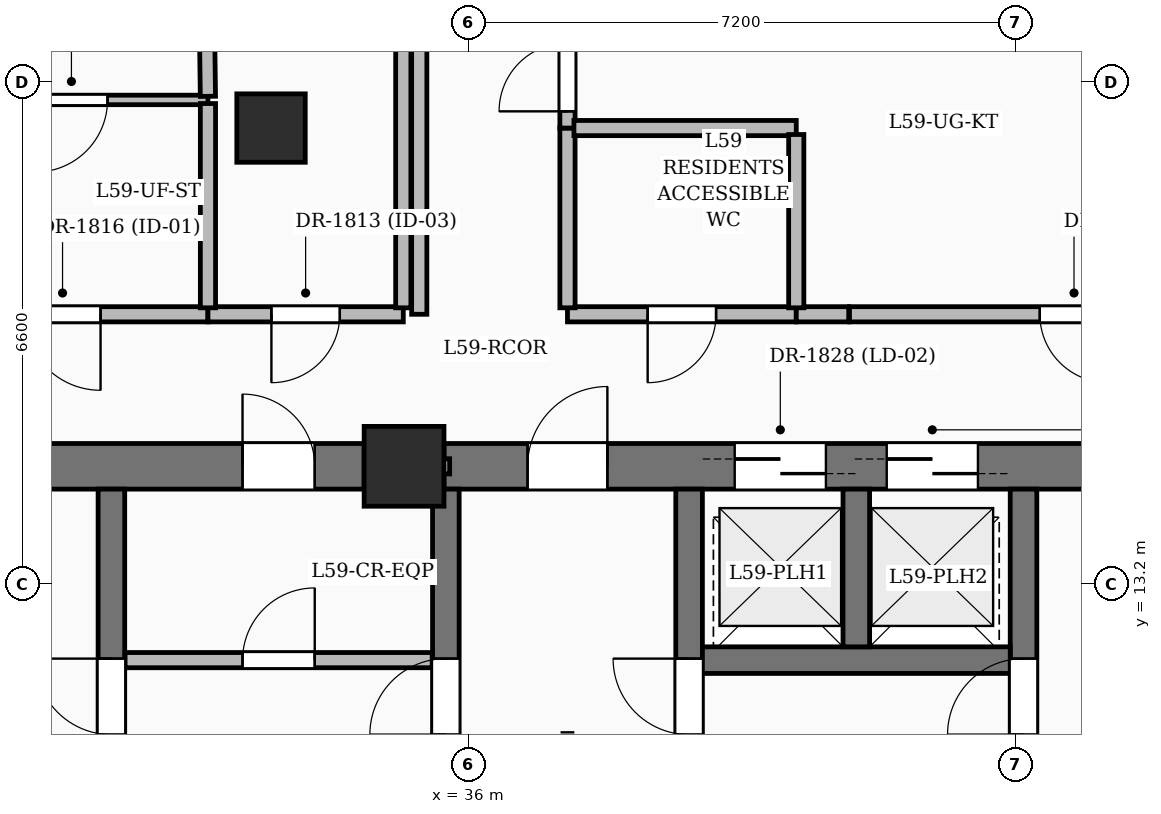
"""IFC4 building model, lengths in metres.
Left out: names, types, materials, properties, quantities, classifications, styles, units other than length and angle.
Written with IfcOpenShell. Run it as: python <this file> out.ifc"""

import sys

from ifc_helpers import new_model, si_unit, direction, frame, frame_2d, origin, origin_2d, place, context, subcontext, project, spatial, rectangle, extrude, element, fill, save


model = new_model("IFC4")
c1 = context("Model", 3, precision=1e-05, world=origin(), true_north=direction((0.0, 1.0)))
c2 = subcontext(c1, "Body", "Model", "MODEL_VIEW")
j1 = project(units=[si_unit("LENGTHUNIT", "METRE"), si_unit("PLANEANGLEUNIT", "RADIAN")], contexts=[c1])
p1 = place(None, origin())
s1 = spatial("IfcSite", under=j1, at=p1, CompositionType="ELEMENT")
p2 = place(p1, origin())
s2 = spatial("IfcBuilding", under=s1, at=p2, CompositionType="ELEMENT")
p3 = place(p2, frame((0.0, 0.0, 229.5)))
s3 = spatial("IfcBuildingStorey", under=s2, at=p3, CompositionType="ELEMENT", Elevation=229.5)
p4 = place(p3, frame((35.15, 14.75, 0.0), z_axis=(0.0, 0.0, 1.0), x_axis=(1.0, 0.0, 0.0)))
e1 = element("IfcColumn", 1, at=p4, inside=s3, PredefinedType="COLUMN", context=c2, shape_type="SweptSolid", body=[
    extrude(rectangle(XDim=1.05, YDim=1.05, at=origin_2d()), origin(), (0.0, 0.0, 1.0), 3.75),
])
p5 = place(p3, frame((33.4, 19.2, 0.0), z_axis=(0.0, 0.0, 1.0), x_axis=(1.0, 0.0, 0.0)))
e2 = element("IfcColumn", 2, at=p5, inside=s3, PredefinedType="COLUMN", context=c2, shape_type="SweptSolid", body=[
    extrude(rectangle(XDim=0.9, YDim=0.9, at=origin_2d()), origin(), (0.0, 0.0, 1.0), 3.75),
])
p6 = place(p3, frame((28.075, 14.75, 0.0), z_axis=(0.0, 0.0, 1.0), x_axis=(1.0, 0.0, 0.0)))
e3 = element("IfcWall", 3, at=p6, inside=s3, PredefinedType="SHEAR", context=c2, shape_type="SweptSolid", body=[
    extrude(rectangle(XDim=6.55, YDim=0.6, at=frame_2d((3.275, 0.0))), origin(), (0.0, 0.0, 1.0), 3.75),
])
p7 = place(p6, frame((1.1, 0.0, 0.0)))
e4 = element("IfcOpeningElement", 4, at=p7, cuts=e3, PredefinedType="OPENING", context=c2, shape_type="SweptSolid", body=[
    extrude(rectangle(XDim=1.05, YDim=2.15, at=frame_2d((0.525, 1.075))), frame((0.0, 0.31, 0.0), z_axis=(0.0, -1.0, 0.0), x_axis=(1.0, 0.0, 0.0)), (0.0, 0.0, 1.0), 0.62),
])
p8 = place(p6, frame((4.95, 0.0, 0.0)))
e5 = element("IfcOpeningElement", 5, at=p8, cuts=e3, PredefinedType="OPENING", context=c2, shape_type="SweptSolid", body=[
    extrude(rectangle(XDim=0.95, YDim=2.15, at=frame_2d((0.475, 1.075))), frame((0.0, 0.31, 0.0), z_axis=(0.0, -1.0, 0.0), x_axis=(1.0, 0.0, 0.0)), (0.0, 0.0, 1.0), 0.62),
])
p9 = place(p3, frame((35.675, 14.75, 0.0), z_axis=(0.0, 0.0, 1.0), x_axis=(1.0, 0.0, 0.0)))
e6 = element("IfcWall", 6, at=p9, inside=s3, PredefinedType="SHEAR", context=c2, shape_type="SweptSolid", body=[
    extrude(rectangle(XDim=10.85, YDim=0.6, at=frame_2d((5.425, 0.0))), origin(), (0.0, 0.0, 1.0), 3.75),
])
p10 = place(p9, frame((1.1, 0.0, 0.0)))
e7 = element("IfcOpeningElement", 7, at=p10, cuts=e6, PredefinedType="OPENING", context=c2, shape_type="SweptSolid", body=[
    extrude(rectangle(XDim=1.05, YDim=2.15, at=frame_2d((0.525, 1.075))), frame((0.0, 0.31, 0.0), z_axis=(0.0, -1.0, 0.0), x_axis=(1.0, 0.0, 0.0)), (0.0, 0.0, 1.0), 0.62),
])
p11 = place(p9, frame((8.7, 0.0, 0.0)))
e8 = element("IfcOpeningElement", 8, at=p11, cuts=e6, PredefinedType="OPENING", context=c2, shape_type="SweptSolid", body=[
    extrude(rectangle(XDim=1.05, YDim=2.15, at=frame_2d((0.525, 1.075))), frame((0.0, 0.31, 0.0), z_axis=(0.0, -1.0, 0.0), x_axis=(1.0, 0.0, 0.0)), (0.0, 0.0, 1.0), 0.62),
])
p12 = place(p9, frame((3.825, 0.0, 0.0)))
e9 = element("IfcOpeningElement", 9, at=p12, cuts=e6, PredefinedType="OPENING", context=c2, shape_type="SweptSolid", body=[
    extrude(rectangle(XDim=1.2, YDim=2.2, at=frame_2d((0.6, 1.1))), frame((0.0, 0.31, 0.0), z_axis=(0.0, -1.0, 0.0), x_axis=(1.0, 0.0, 0.0)), (0.0, 0.0, 1.0), 0.62),
])
p13 = place(p9, frame((5.825, 0.0, 0.0)))
e10 = element("IfcOpeningElement", 10, at=p13, cuts=e6, PredefinedType="OPENING", context=c2, shape_type="SweptSolid", body=[
    extrude(rectangle(XDim=1.2, YDim=2.2, at=frame_2d((0.6, 1.1))), frame((0.0, 0.31, 0.0), z_axis=(0.0, -1.0, 0.0), x_axis=(1.0, 0.0, 0.0)), (0.0, 0.0, 1.0), 0.62),
])
p14 = place(p3, frame((31.3, 5.2, 0.0), z_axis=(0.0, 0.0, 1.0), x_axis=(0.0, 1.0, 0.0)))
e11 = element("IfcWall", 11, at=p14, inside=s3, PredefinedType="SOLIDWALL", context=c2, shape_type="SweptSolid", body=[
    extrude(rectangle(XDim=9.25, YDim=0.35, at=frame_2d((4.625, 0.0))), origin(), (0.0, 0.0, 1.0), 3.75),
])
p15 = place(p14, frame((6.02, 0.0, 0.0)))
e12 = element("IfcOpeningElement", 12, at=p15, cuts=e11, PredefinedType="OPENING", context=c2, shape_type="SweptSolid", body=[
    extrude(rectangle(XDim=1.0, YDim=2.15, at=frame_2d((0.5, 1.075))), frame((0.0, 0.185, 0.0), z_axis=(0.0, -1.0, 0.0), x_axis=(1.0, 0.0, 0.0)), (0.0, 0.0, 1.0), 0.37),
])
p16 = place(p3, frame((35.7, 5.2, 0.0), z_axis=(0.0, 0.0, 1.0), x_axis=(0.0, 1.0, 0.0)))
e13 = element("IfcWall", 13, at=p16, inside=s3, PredefinedType="SOLIDWALL", context=c2, shape_type="SweptSolid", body=[
    extrude(rectangle(XDim=9.25, YDim=0.35, at=frame_2d((4.625, 0.0))), origin(), (0.0, 0.0, 1.0), 3.75),
])
p17 = place(p16, frame((6.02, 0.0, 0.0)))
e14 = element("IfcOpeningElement", 14, at=p17, cuts=e13, PredefinedType="OPENING", context=c2, shape_type="SweptSolid", body=[
    extrude(rectangle(XDim=1.0, YDim=2.15, at=frame_2d((0.5, 1.075))), frame((0.0, 0.185, 0.0), z_axis=(0.0, -1.0, 0.0), x_axis=(1.0, 0.0, 0.0)), (0.0, 0.0, 1.0), 0.37),
])
p18 = place(p3, frame((38.9, 5.2, 0.0), z_axis=(0.0, 0.0, 1.0), x_axis=(0.0, 1.0, 0.0)))
e15 = element("IfcWall", 15, at=p18, inside=s3, PredefinedType="SOLIDWALL", context=c2, shape_type="SweptSolid", body=[
    extrude(rectangle(XDim=9.25, YDim=0.35, at=frame_2d((4.625, 0.0))), origin(), (0.0, 0.0, 1.0), 3.75),
])
p19 = place(p18, frame((6.02, 0.0, 0.0)))
e16 = element("IfcOpeningElement", 16, at=p19, cuts=e15, PredefinedType="OPENING", context=c2, shape_type="SweptSolid", body=[
    extrude(rectangle(XDim=1.0, YDim=2.15, at=frame_2d((0.5, 1.075))), frame((0.0, 0.185, 0.0), z_axis=(0.0, -1.0, 0.0), x_axis=(1.0, 0.0, 0.0)), (0.0, 0.0, 1.0), 0.37),
])
p20 = place(p3, frame((43.3, 5.2, 0.0), z_axis=(0.0, 0.0, 1.0), x_axis=(0.0, 1.0, 0.0)))
e17 = element("IfcWall", 17, at=p20, inside=s3, PredefinedType="SOLIDWALL", context=c2, shape_type="SweptSolid", body=[
    extrude(rectangle(XDim=9.25, YDim=0.35, at=frame_2d((4.625, 0.0))), origin(), (0.0, 0.0, 1.0), 3.75),
])
p21 = place(p20, frame((6.02, 0.0, 0.0)))
e18 = element("IfcOpeningElement", 18, at=p21, cuts=e17, PredefinedType="OPENING", context=c2, shape_type="SweptSolid", body=[
    extrude(rectangle(XDim=1.0, YDim=2.15, at=frame_2d((0.5, 1.075))), frame((0.0, 0.185, 0.0), z_axis=(0.0, -1.0, 0.0), x_axis=(1.0, 0.0, 0.0)), (0.0, 0.0, 1.0), 0.37),
])
p22 = place(p3, frame((39.075, 12.2, 0.0), z_axis=(0.0, 0.0, 1.0), x_axis=(1.0, 0.0, 0.0)))
e19 = element("IfcWall", 19, at=p22, inside=s3, PredefinedType="SOLIDWALL", context=c2, shape_type="SweptSolid", body=[
    extrude(rectangle(XDim=4.05, YDim=0.35, at=frame_2d((2.025, 0.0))), origin(), (0.0, 0.0, 1.0), 3.75),
])
p23 = place(p3, frame((41.1, 12.375, 0.0), z_axis=(0.0, 0.0, 1.0), x_axis=(0.0, 1.0, 0.0)))
e20 = element("IfcWall", 20, at=p23, inside=s3, PredefinedType="SOLIDWALL", context=c2, shape_type="SweptSolid", body=[
    extrude(rectangle(XDim=2.075, YDim=0.35, at=frame_2d((1.038, 0.0))), origin(), (0.0, 0.0, 1.0), 3.75),
])
p24 = place(p3, frame((34.72, 14.75, 0.0), z_axis=(0.0, 0.0, 1.0), x_axis=(1.0, 0.0, 0.0)))
e21 = element("IfcWall", 21, at=p24, inside=s3, PredefinedType="PARTITIONING", context=c2, shape_type="SweptSolid", body=[
    extrude(rectangle(XDim=1.03, YDim=0.2, at=frame_2d((0.515, 0.0))), origin(), (0.0, 0.0, 1.0), 2.685),
])
p25 = place(p3, frame((31.48, 12.2, 0.0), z_axis=(0.0, 0.0, 1.0), x_axis=(1.0, 0.0, 0.0)))
e22 = element("IfcWall", 22, at=p25, inside=s3, PredefinedType="PARTITIONING", context=c2, shape_type="SweptSolid", body=[
    extrude(rectangle(XDim=4.04, YDim=0.2, at=frame_2d((2.02, 0.0))), origin(), (0.0, 0.0, 1.0), 3.5),
])
p26 = place(p25, frame((1.545, 0.0, 0.0)))
e23 = element("IfcOpeningElement", 23, at=p26, cuts=e22, PredefinedType="OPENING", context=c2, shape_type="SweptSolid", body=[
    extrude(rectangle(XDim=0.95, YDim=2.15, at=frame_2d((0.475, 1.075))), frame((0.0, 0.11, 0.0), z_axis=(0.0, -1.0, 0.0), x_axis=(1.0, 0.0, 0.0)), (0.0, 0.0, 1.0), 0.22),
])
p27 = place(p3, frame((46.715, 16.75, 0.0), z_axis=(0.0, 0.0, 1.0), x_axis=(-1.0, 0.0, 0.0)))
e24 = element("IfcWall", 24, at=p27, inside=s3, PredefinedType="PARTITIONING", context=c2, shape_type="SweptSolid", body=[
    extrude(rectangle(XDim=5.705, YDim=0.2, at=frame_2d((2.853, 0.0))), origin(), (0.0, 0.0, 1.0), 2.685),
])
p28 = place(p27, frame((2.301, 0.0, 0.0)))
e25 = element("IfcOpeningElement", 25, at=p28, cuts=e24, PredefinedType="OPENING", context=c2, shape_type="SweptSolid", body=[
    extrude(rectangle(XDim=0.9, YDim=2.1, at=frame_2d((0.45, 1.05))), frame((0.0, 0.11, 0.0), z_axis=(0.0, -1.0, 0.0), x_axis=(1.0, 0.0, 0.0)), (0.0, 0.0, 1.0), 0.22),
])
p29 = place(p3, frame((32.57, 16.75, 0.0), z_axis=(0.0, 0.0, 1.0), x_axis=(-1.0, 0.0, 0.0)))
e26 = element("IfcWall", 26, at=p29, inside=s3, PredefinedType="PARTITIONING", context=c2, shape_type="SweptSolid", body=[
    extrude(rectangle(XDim=3.71, YDim=0.2, at=frame_2d((1.855, 0.0))), origin(), (0.0, 0.0, 1.0), 3.5),
])
p30 = place(p29, frame((1.413, 0.0, 0.0)))
e27 = element("IfcOpeningElement", 27, at=p30, cuts=e26, PredefinedType="OPENING", context=c2, shape_type="SweptSolid", body=[
    extrude(rectangle(XDim=1.0, YDim=2.2, at=frame_2d((0.5, 1.1))), frame((0.0, 0.11, 0.0), z_axis=(0.0, -1.0, 0.0), x_axis=(1.0, 0.0, 0.0)), (0.0, 0.0, 1.0), 0.22),
])
p31 = place(p3, frame((40.31, 16.75, 0.0), z_axis=(0.0, 0.0, 1.0), x_axis=(-1.0, 0.0, 0.0)))
e28 = element("IfcWall", 28, at=p31, inside=s3, PredefinedType="PARTITIONING", context=c2, shape_type="SweptSolid", body=[
    extrude(rectangle(XDim=3.01, YDim=0.2, at=frame_2d((1.505, 0.0))), origin(), (0.0, 0.0, 1.0), 3.5),
])
p32 = place(p31, frame((1.055, 0.0, 0.0)))
e29 = element("IfcOpeningElement", 29, at=p32, cuts=e28, PredefinedType="OPENING", context=c2, shape_type="SweptSolid", body=[
    extrude(rectangle(XDim=0.9, YDim=2.1, at=frame_2d((0.45, 1.05))), frame((0.0, 0.11, 0.0), z_axis=(0.0, -1.0, 0.0), x_axis=(1.0, 0.0, 0.0)), (0.0, 0.0, 1.0), 0.22),
])
p33 = place(p3, frame((37.3, 16.835, 0.0), z_axis=(0.0, 0.0, 1.0), x_axis=(0.0, 1.0, 0.0)))
e30 = element("IfcWall", 30, at=p33, inside=s3, PredefinedType="PARTITIONING", context=c2, shape_type="SweptSolid", body=[
    extrude(rectangle(XDim=2.365, YDim=0.2, at=frame_2d((1.183, 0.0))), origin(), (0.0, 0.0, 1.0), 3.5),
])
p34 = place(p3, frame((37.3, 19.2, 0.0), z_axis=(0.0, 0.0, 1.0), x_axis=(0.0, 1.0, 0.0)))
e31 = element("IfcWall", 31, at=p34, inside=s3, PredefinedType="PARTITIONING", context=c2, shape_type="SweptSolid", body=[
    extrude(rectangle(XDim=1.34, YDim=0.2, at=frame_2d((0.67, 0.0))), origin(), (0.0, 0.0, 1.0), 3.5),
])
p35 = place(p34, frame((0.22, 0.0, 0.0)))
e32 = element("IfcOpeningElement", 32, at=p35, cuts=e31, PredefinedType="OPENING", context=c2, shape_type="SweptSolid", body=[
    extrude(rectangle(XDim=0.9, YDim=2.1, at=frame_2d((0.45, 1.05))), frame((0.0, 0.11, 0.0), z_axis=(0.0, -1.0, 0.0), x_axis=(1.0, 0.0, 0.0)), (0.0, 0.0, 1.0), 0.22),
])
p36 = place(p3, frame((41.0, 16.75, 0.0), z_axis=(0.0, 0.0, 1.0), x_axis=(-1.0, 0.0, 0.0)))
e33 = element("IfcWall", 33, at=p36, inside=s3, PredefinedType="PARTITIONING", context=c2, shape_type="SweptSolid", body=[
    extrude(rectangle(XDim=0.69, YDim=0.2, at=frame_2d((0.345, 0.0))), origin(), (0.0, 0.0, 1.0), 3.5),
])
p37 = place(p3, frame((35.14, 16.75, 0.0), z_axis=(0.0, 0.0, 1.0), x_axis=(-1.0, 0.0, 0.0)))
e34 = element("IfcWall", 34, at=p37, inside=s3, PredefinedType="PARTITIONING", context=c2, shape_type="SweptSolid", body=[
    extrude(rectangle(XDim=2.57, YDim=0.2, at=frame_2d((1.285, 0.0))), origin(), (0.0, 0.0, 1.0), 2.685),
])
p38 = place(p37, frame((0.835, 0.0, 0.0)))
e35 = element("IfcOpeningElement", 35, at=p38, cuts=e34, PredefinedType="OPENING", context=c2, shape_type="SweptSolid", body=[
    extrude(rectangle(XDim=0.9, YDim=2.1, at=frame_2d((0.45, 1.05))), frame((0.0, 0.11, 0.0), z_axis=(0.0, -1.0, 0.0), x_axis=(1.0, 0.0, 0.0)), (0.0, 0.0, 1.0), 0.22),
])
p39 = place(p3, frame((35.35, 24.315, 0.0), z_axis=(0.0, 0.0, 1.0), x_axis=(0.0, -1.0, 0.0)))
e36 = element("IfcWall", 36, at=p39, inside=s3, PredefinedType="PARTITIONING", context=c2, shape_type="SweptSolid", body=[
    extrude(rectangle(XDim=7.565, YDim=0.2, at=frame_2d((3.782, 0.0))), origin(), (0.0, 0.0, 1.0), 2.685),
])
p40 = place(p3, frame((32.57, 19.57, 0.0), z_axis=(0.0, 0.0, 1.0), x_axis=(-1.0, 0.0, 0.0)))
e37 = element("IfcWall", 37, at=p40, inside=s3, PredefinedType="PARTITIONING", context=c2, shape_type="SweptSolid", body=[
    extrude(rectangle(XDim=3.71, YDim=0.125, at=frame_2d((1.855, 0.0))), origin(), (0.0, 0.0, 1.0), 3.01),
])
p41 = place(p40, frame((1.321, 0.0, 0.0)))
e38 = element("IfcOpeningElement", 38, at=p41, cuts=e37, PredefinedType="OPENING", context=c2, shape_type="SweptSolid", body=[
    extrude(rectangle(XDim=0.95, YDim=2.2, at=frame_2d((0.475, 1.1))), frame((0.0, 0.072, 0.0), z_axis=(0.0, -1.0, 0.0), x_axis=(1.0, 0.0, 0.0)), (0.0, 0.0, 1.0), 0.145),
])
p42 = place(p3, frame((32.57, 16.835, 0.0), z_axis=(0.0, 0.0, 1.0), x_axis=(0.0, 1.0, 0.0)))
e39 = element("IfcWall", 39, at=p42, inside=s3, PredefinedType="PARTITIONING", context=c2, shape_type="SweptSolid", body=[
    extrude(rectangle(XDim=2.688, YDim=0.2, at=frame_2d((1.344, 0.0))), origin(), (0.0, 0.0, 1.0), 3.5),
])
p43 = place(p3, frame((32.57, 19.617, 0.0), z_axis=(0.0, 0.0, 1.0), x_axis=(-0.013267344969, 0.999911984905, 0.0)))
e40 = element("IfcWall", 40, at=p43, inside=s3, PredefinedType="PARTITIONING", context=c2, shape_type="SweptSolid", body=[
    extrude(rectangle(XDim=9.09, YDim=0.2, at=frame_2d((4.545, 0.0))), origin(), (0.0, 0.0, 1.0), 2.685),
])
p44 = place(p3, frame((40.31, 19.2, 0.0), z_axis=(0.0, 0.0, 1.0), x_axis=(-1.0, 0.0, 0.0)))
e41 = element("IfcWall", 41, at=p44, inside=s3, PredefinedType="PARTITIONING", context=c2, shape_type="SweptSolid", body=[
    extrude(rectangle(XDim=2.925, YDim=0.2, at=frame_2d((1.462, 0.0))), origin(), (0.0, 0.0, 1.0), 3.5),
])
p45 = place(p3, frame((40.31, 16.835, 0.0), z_axis=(0.0, 0.0, 1.0), x_axis=(0.0, 1.0, 0.0)))
e42 = element("IfcWall", 42, at=p45, inside=s3, PredefinedType="PARTITIONING", context=c2, shape_type="SweptSolid", body=[
    extrude(rectangle(XDim=2.28, YDim=0.2, at=frame_2d((1.14, 0.0))), origin(), (0.0, 0.0, 1.0), 3.5),
])
p46 = place(p3, frame((35.14, 16.835, 0.0), z_axis=(0.0, 0.0, 1.0), x_axis=(0.0, 1.0, 0.0)))
e43 = element("IfcWall", 43, at=p46, inside=s3, PredefinedType="PARTITIONING", context=c2, shape_type="SweptSolid", body=[
    extrude(rectangle(XDim=12.065, YDim=0.2, at=frame_2d((6.032, 0.0))), origin(), (0.0, 0.0, 1.0), 2.685),
])
p47 = place(p10, origin())
e44 = element("IfcDoor", 44, at=p47, inside=s3, OperationType="SINGLE_SWING_RIGHT", PredefinedType="DOOR", context=c2, shape_type="SweptSolid", body=[
    extrude(rectangle(XDim=1.05, YDim=2.15, at=frame_2d((0.525, 1.075))), frame((0.0, 0.025, 0.0), z_axis=(0.0, -1.0, 0.0), x_axis=(1.0, 0.0, 0.0)), (0.0, 0.0, 1.0), 0.05),
])
fill(e7, e44)
p48 = place(p15, origin())
e45 = element("IfcDoor", 45, at=p48, inside=s3, OperationType="SINGLE_SWING_RIGHT", PredefinedType="DOOR", context=c2, shape_type="SweptSolid", body=[
    extrude(rectangle(XDim=1.0, YDim=2.15, at=frame_2d((0.5, 1.075))), frame((0.0, 0.025, 0.0), z_axis=(0.0, -1.0, 0.0), x_axis=(1.0, 0.0, 0.0)), (0.0, 0.0, 1.0), 0.05),
])
fill(e12, e45)
p49 = place(p17, origin())
e46 = element("IfcDoor", 46, at=p49, inside=s3, OperationType="SINGLE_SWING_LEFT", PredefinedType="DOOR", context=c2, shape_type="SweptSolid", body=[
    extrude(rectangle(XDim=1.0, YDim=2.15, at=frame_2d((0.5, 1.075))), frame((0.0, 0.025, 0.0), z_axis=(0.0, -1.0, 0.0), x_axis=(1.0, 0.0, 0.0)), (0.0, 0.0, 1.0), 0.05),
])
fill(e14, e46)
p50 = place(p19, origin())
e47 = element("IfcDoor", 47, at=p50, inside=s3, OperationType="SINGLE_SWING_RIGHT", PredefinedType="DOOR", context=c2, shape_type="SweptSolid", body=[
    extrude(rectangle(XDim=1.0, YDim=2.15, at=frame_2d((0.5, 1.075))), frame((0.0, 0.025, 0.0), z_axis=(0.0, -1.0, 0.0), x_axis=(1.0, 0.0, 0.0)), (0.0, 0.0, 1.0), 0.05),
])
fill(e16, e47)
p51 = place(p21, origin())
e48 = element("IfcDoor", 48, at=p51, inside=s3, OperationType="SINGLE_SWING_LEFT", PredefinedType="DOOR", context=c2, shape_type="SweptSolid", body=[
    extrude(rectangle(XDim=1.0, YDim=2.15, at=frame_2d((0.5, 1.075))), frame((0.0, 0.025, 0.0), z_axis=(0.0, -1.0, 0.0), x_axis=(1.0, 0.0, 0.0)), (0.0, 0.0, 1.0), 0.05),
])
fill(e18, e48)
p52 = place(p12, origin())
e49 = element("IfcDoor", 49, at=p52, inside=s3, OperationType="DOUBLE_DOOR_SLIDING", PredefinedType="DOOR", context=c2, shape_type="SweptSolid", body=[
    extrude(rectangle(XDim=1.2, YDim=2.2, at=frame_2d((0.6, 1.1))), frame((0.0, 0.025, 0.0), z_axis=(0.0, -1.0, 0.0), x_axis=(1.0, 0.0, 0.0)), (0.0, 0.0, 1.0), 0.05),
])
fill(e9, e49)
p53 = place(p13, origin())
e50 = element("IfcDoor", 50, at=p53, inside=s3, OperationType="DOUBLE_DOOR_SLIDING", PredefinedType="DOOR", context=c2, shape_type="SweptSolid", body=[
    extrude(rectangle(XDim=1.2, YDim=2.2, at=frame_2d((0.6, 1.1))), frame((0.0, 0.025, 0.0), z_axis=(0.0, -1.0, 0.0), x_axis=(1.0, 0.0, 0.0)), (0.0, 0.0, 1.0), 0.05),
])
fill(e10, e50)
p54 = place(p26, origin())
e51 = element("IfcDoor", 51, at=p54, inside=s3, OperationType="SINGLE_SWING_RIGHT", PredefinedType="DOOR", context=c2, shape_type="SweptSolid", body=[
    extrude(rectangle(XDim=0.95, YDim=2.15, at=frame_2d((0.475, 1.075))), frame((0.0, 0.025, 0.0), z_axis=(0.0, -1.0, 0.0), x_axis=(1.0, 0.0, 0.0)), (0.0, 0.0, 1.0), 0.05),
])
fill(e23, e51)
p55 = place(p8, origin())
e52 = element("IfcDoor", 52, at=p55, inside=s3, OperationType="SINGLE_SWING_LEFT", PredefinedType="DOOR", context=c2, shape_type="SweptSolid", body=[
    extrude(rectangle(XDim=0.95, YDim=2.15, at=frame_2d((0.475, 1.075))), frame((0.0, 0.025, 0.0), z_axis=(0.0, -1.0, 0.0), x_axis=(1.0, 0.0, 0.0)), (0.0, 0.0, 1.0), 0.05),
])
fill(e5, e52)
p56 = place(p28, origin())
e53 = element("IfcDoor", 53, at=p56, inside=s3, OperationType="SINGLE_SWING_LEFT", PredefinedType="DOOR", context=c2, shape_type="SweptSolid", body=[
    extrude(rectangle(XDim=0.9, YDim=2.1, at=frame_2d((0.45, 1.05))), frame((0.0, 0.025, 0.0), z_axis=(0.0, -1.0, 0.0), x_axis=(1.0, 0.0, 0.0)), (0.0, 0.0, 1.0), 0.05),
])
fill(e25, e53)
p57 = place(p38, origin())
e54 = element("IfcDoor", 54, at=p57, inside=s3, OperationType="SINGLE_SWING_RIGHT", PredefinedType="DOOR", context=c2, shape_type="SweptSolid", body=[
    extrude(rectangle(XDim=0.9, YDim=2.1, at=frame_2d((0.45, 1.05))), frame((0.0, 0.025, 0.0), z_axis=(0.0, -1.0, 0.0), x_axis=(1.0, 0.0, 0.0)), (0.0, 0.0, 1.0), 0.05),
])
fill(e35, e54)
p58 = place(p32, origin())
e55 = element("IfcDoor", 55, at=p58, inside=s3, OperationType="SINGLE_SWING_RIGHT", PredefinedType="DOOR", context=c2, shape_type="SweptSolid", body=[
    extrude(rectangle(XDim=0.9, YDim=2.1, at=frame_2d((0.45, 1.05))), frame((0.0, 0.025, 0.0), z_axis=(0.0, -1.0, 0.0), x_axis=(1.0, 0.0, 0.0)), (0.0, 0.0, 1.0), 0.05),
])
fill(e29, e55)
p59 = place(p30, origin())
e56 = element("IfcDoor", 56, at=p59, inside=s3, OperationType="SINGLE_SWING_LEFT", PredefinedType="DOOR", context=c2, shape_type="SweptSolid", body=[
    extrude(rectangle(XDim=1.0, YDim=2.2, at=frame_2d((0.5, 1.1))), frame((0.0, 0.025, 0.0), z_axis=(0.0, -1.0, 0.0), x_axis=(1.0, 0.0, 0.0)), (0.0, 0.0, 1.0), 0.05),
])
fill(e27, e56)
p60 = place(p41, origin())
e57 = element("IfcDoor", 57, at=p60, inside=s3, OperationType="SINGLE_SWING_RIGHT", PredefinedType="DOOR", context=c2, shape_type="SweptSolid", body=[
    extrude(rectangle(XDim=0.95, YDim=2.2, at=frame_2d((0.475, 1.1))), frame((0.0, 0.025, 0.0), z_axis=(0.0, -1.0, 0.0), x_axis=(1.0, 0.0, 0.0)), (0.0, 0.0, 1.0), 0.05),
])
fill(e38, e57)
p61 = place(p35, origin())
e58 = element("IfcDoor", 58, at=p61, inside=s3, OperationType="SINGLE_SWING_LEFT", PredefinedType="DOOR", context=c2, shape_type="SweptSolid", body=[
    extrude(rectangle(XDim=0.9, YDim=2.1, at=frame_2d((0.45, 1.05))), frame((0.0, 0.025, 0.0), z_axis=(0.0, -1.0, 0.0), x_axis=(1.0, 0.0, 0.0)), (0.0, 0.0, 1.0), 0.05),
])
fill(e32, e58)
save(model, sys.argv[1])
